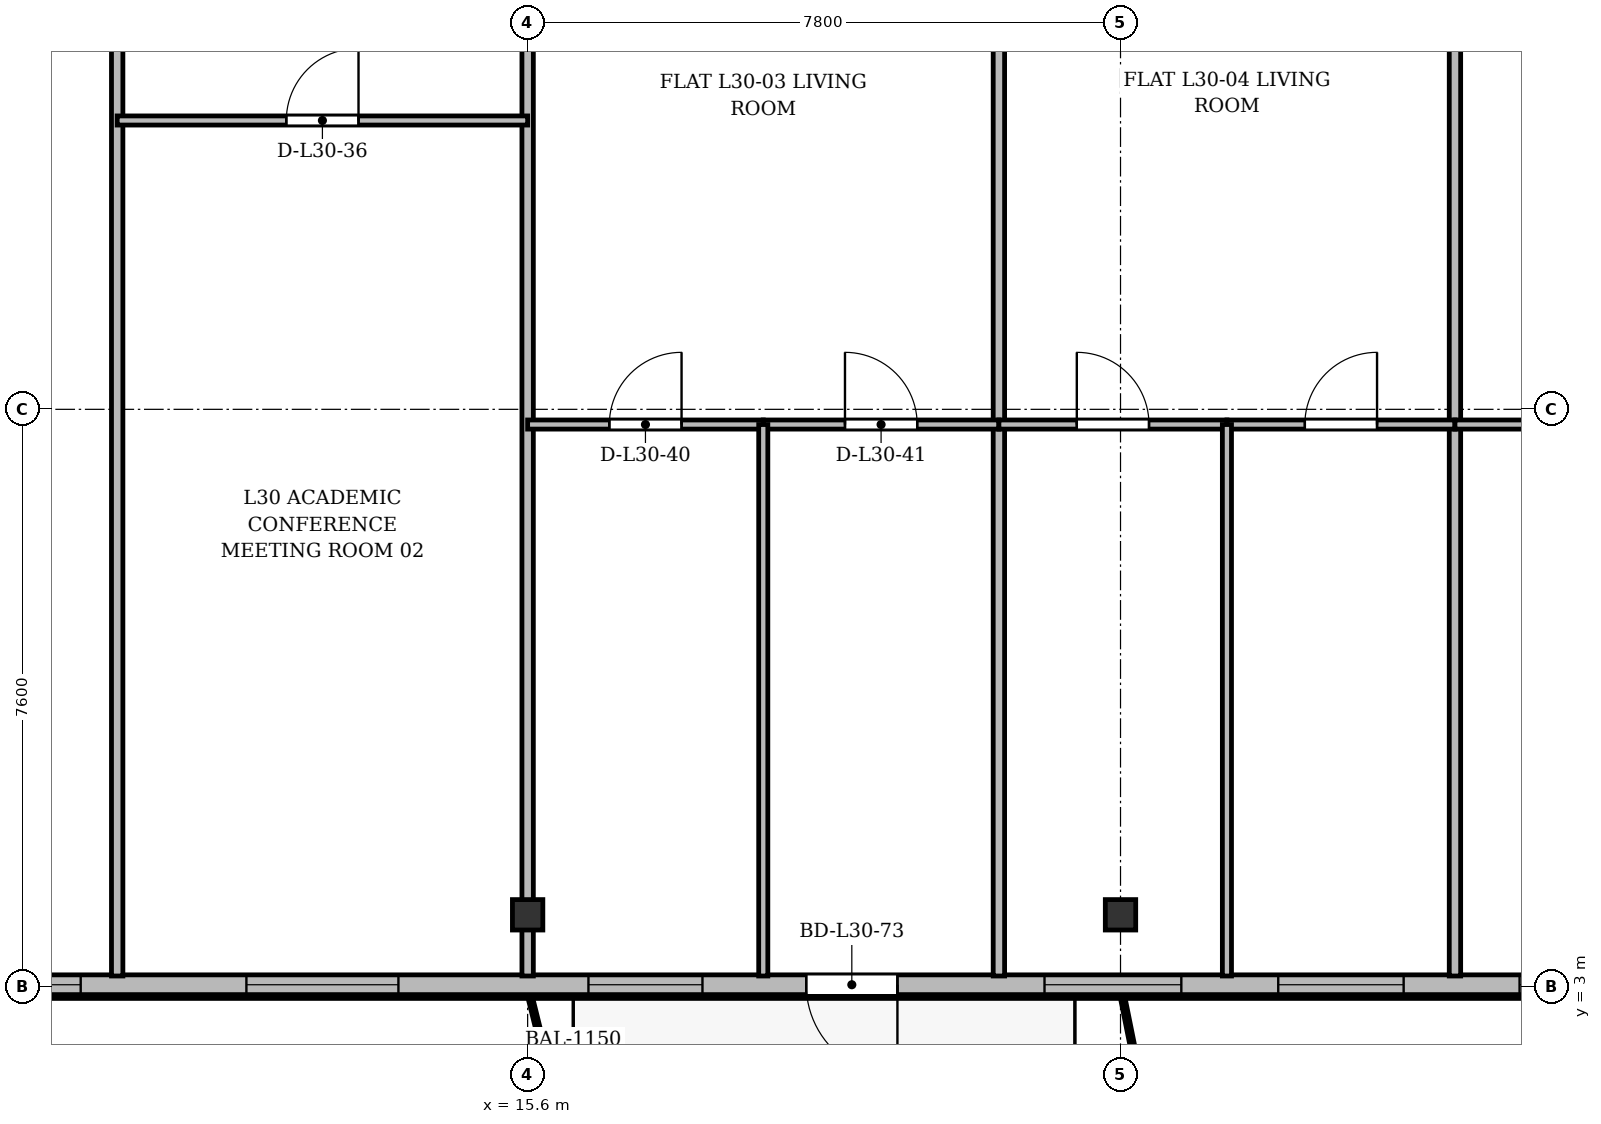
"""IFC4 building model, lengths in metres.
Left out: names, types, materials, properties, quantities, classifications, styles, units other than length and angle.
Written with IfcOpenShell. Run it as: python <this file> out.ifc"""

import sys

from ifc_helpers import new_model, si_unit, direction, frame, frame_2d, origin, origin_2d, place, context, subcontext, project, spatial, rectangle, i_section, extrude, source, transform, mapped, element, fill, save


model = new_model("IFC4")
c1 = context("Model", 3, precision=1e-05, world=origin(), true_north=direction((0.0, 1.0)))
c2 = subcontext(c1, "Body", "Model", "MODEL_VIEW")
j1 = project(units=[si_unit("LENGTHUNIT", "METRE"), si_unit("PLANEANGLEUNIT", "RADIAN")], contexts=[c1])
p1 = place(None, origin())
s1 = spatial("IfcSite", under=j1, at=p1, CompositionType="ELEMENT")
p2 = place(p1, origin())
s2 = spatial("IfcBuilding", under=s1, at=p2, CompositionType="ELEMENT")
p3 = place(p2, frame((0.0, 0.0, 117.7)))
s3 = spatial("IfcBuildingStorey", under=s2, at=p3, CompositionType="ELEMENT", Elevation=117.7)
m1 = source(origin(), c2, "Body", "SweptSolid", [
    extrude(i_section(OverallWidth=0.4, OverallDepth=0.4, WebThickness=0.022, FlangeThickness=0.035, at=origin_2d()), origin(), (0.0, 0.0, 1.0), 3.6),
])
for number, where, z_axis, x_axis in (
    (1, (15.6, 3.95, 0.0), (0.0, 0.0, 1.0), (1.0, 0.0, 0.0)),
    (2, (23.4, 3.95, 0.0), (0.0, 0.0, 1.0), (1.0, 0.0, 0.0)),
):
    element("IfcColumn", number, at=place(p3, frame(where, z_axis=z_axis, x_axis=x_axis)), inside=s3, PredefinedType="COLUMN", context=c2, shape_type="MappedRepresentation", body=[
        mapped(m1, transform((0.0, 0.0, 0.0), x_axis=(1.0, 0.0, 0.0), y_axis=(0.0, 1.0, 0.0), z_axis=(0.0, 0.0, 1.0), scale=1.0)),
    ])
p4 = place(p3, frame((66.9, 3.03, 0.0), z_axis=(0.0, 0.0, 1.0), x_axis=(-1.0, 0.0, 0.0)))
e3 = element("IfcWall", 3, at=p4, inside=s3, PredefinedType="SOLIDWALL", context=c2, shape_type="SweptSolid", body=[
    extrude(rectangle(XDim=59.4, YDim=0.26, at=frame_2d((29.7, 0.0))), origin(), (0.0, 0.0, 1.0), 3.34),
])
p5 = place(p4, frame((0.395, 0.0, 0.9)))
e4 = element("IfcOpeningElement", 4, at=p5, cuts=e3, PredefinedType="OPENING", context=c2, shape_type="SweptSolid", body=[
    extrude(rectangle(XDim=1.8, YDim=1.8, at=frame_2d((0.9, 0.9))), frame((0.0, 0.14, 0.0), z_axis=(0.0, -1.0, 0.0), x_axis=(1.0, 0.0, 0.0)), (0.0, 0.0, 1.0), 0.28),
])
p6 = place(p4, frame((4.2, 0.0, 0.9)))
e5 = element("IfcOpeningElement", 5, at=p6, cuts=e3, PredefinedType="OPENING", context=c2, shape_type="SweptSolid", body=[
    extrude(rectangle(XDim=2.2, YDim=1.8, at=frame_2d((1.1, 0.9))), frame((0.0, 0.14, 0.0), z_axis=(0.0, -1.0, 0.0), x_axis=(1.0, 0.0, 0.0)), (0.0, 0.0, 1.0), 0.28),
])
p7 = place(p4, frame((11.25, 0.0, 0.9)))
e6 = element("IfcOpeningElement", 6, at=p7, cuts=e3, PredefinedType="OPENING", context=c2, shape_type="SweptSolid", body=[
    extrude(rectangle(XDim=1.5, YDim=1.75, at=frame_2d((0.75, 0.875))), frame((0.0, 0.14, 0.0), z_axis=(0.0, -1.0, 0.0), x_axis=(1.0, 0.0, 0.0)), (0.0, 0.0, 1.0), 0.28),
])
p8 = place(p4, frame((16.92, 0.0, 0.0)))
e7 = element("IfcOpeningElement", 7, at=p8, cuts=e3, PredefinedType="OPENING", context=c2, shape_type="SweptSolid", body=[
    extrude(rectangle(XDim=1.2, YDim=2.2, at=frame_2d((0.6, 1.1))), frame((0.0, 0.14, 0.0), z_axis=(0.0, -1.0, 0.0), x_axis=(1.0, 0.0, 0.0)), (0.0, 0.0, 1.0), 0.28),
])
p9 = place(p4, frame((18.675, 0.0, 0.9)))
e8 = element("IfcOpeningElement", 8, at=p9, cuts=e3, PredefinedType="OPENING", context=c2, shape_type="SweptSolid", body=[
    extrude(rectangle(XDim=1.65, YDim=1.85, at=frame_2d((0.825, 0.925))), frame((0.0, 0.14, 0.0), z_axis=(0.0, -1.0, 0.0), x_axis=(1.0, 0.0, 0.0)), (0.0, 0.0, 1.0), 0.28),
])
p10 = place(p4, frame((21.0, 0.0, 0.9)))
e9 = element("IfcOpeningElement", 9, at=p10, cuts=e3, PredefinedType="OPENING", context=c2, shape_type="SweptSolid", body=[
    extrude(rectangle(XDim=1.8, YDim=1.8, at=frame_2d((0.9, 0.9))), frame((0.0, 0.14, 0.0), z_axis=(0.0, -1.0, 0.0), x_axis=(1.0, 0.0, 0.0)), (0.0, 0.0, 1.0), 0.28),
])
p11 = place(p4, frame((26.3, 0.0, 0.9)))
e10 = element("IfcOpeningElement", 10, at=p11, cuts=e3, PredefinedType="OPENING", context=c2, shape_type="SweptSolid", body=[
    extrude(rectangle(XDim=2.2, YDim=1.8, at=frame_2d((1.1, 0.9))), frame((0.0, 0.14, 0.0), z_axis=(0.0, -1.0, 0.0), x_axis=(1.0, 0.0, 0.0)), (0.0, 0.0, 1.0), 0.28),
])
p12 = place(p4, frame((32.8, 0.0, 0.9)))
e11 = element("IfcOpeningElement", 11, at=p12, cuts=e3, PredefinedType="OPENING", context=c2, shape_type="SweptSolid", body=[
    extrude(rectangle(XDim=1.5, YDim=1.75, at=frame_2d((0.75, 0.875))), frame((0.0, 0.14, 0.0), z_axis=(0.0, -1.0, 0.0), x_axis=(1.0, 0.0, 0.0)), (0.0, 0.0, 1.0), 0.28),
])
p13 = place(p4, frame((36.25, 0.0, 0.9)))
e12 = element("IfcOpeningElement", 12, at=p13, cuts=e3, PredefinedType="OPENING", context=c2, shape_type="SweptSolid", body=[
    extrude(rectangle(XDim=2.0, YDim=1.95, at=frame_2d((1.0, 0.975))), frame((0.0, 0.14, 0.0), z_axis=(0.0, -1.0, 0.0), x_axis=(1.0, 0.0, 0.0)), (0.0, 0.0, 1.0), 0.28),
])
p14 = place(p4, frame((39.775, 0.0, 0.9)))
e13 = element("IfcOpeningElement", 13, at=p14, cuts=e3, PredefinedType="OPENING", context=c2, shape_type="SweptSolid", body=[
    extrude(rectangle(XDim=1.65, YDim=1.85, at=frame_2d((0.825, 0.925))), frame((0.0, 0.14, 0.0), z_axis=(0.0, -1.0, 0.0), x_axis=(1.0, 0.0, 0.0)), (0.0, 0.0, 1.0), 0.28),
])
p15 = place(p4, frame((42.7, 0.0, 0.9)))
e14 = element("IfcOpeningElement", 14, at=p15, cuts=e3, PredefinedType="OPENING", context=c2, shape_type="SweptSolid", body=[
    extrude(rectangle(XDim=1.8, YDim=1.8, at=frame_2d((0.9, 0.9))), frame((0.0, 0.14, 0.0), z_axis=(0.0, -1.0, 0.0), x_axis=(1.0, 0.0, 0.0)), (0.0, 0.0, 1.0), 0.28),
])
p16 = place(p4, frame((46.435, 0.0, 0.0)))
e15 = element("IfcOpeningElement", 15, at=p16, cuts=e3, PredefinedType="OPENING", context=c2, shape_type="SweptSolid", body=[
    extrude(rectangle(XDim=1.2, YDim=2.2, at=frame_2d((0.6, 1.1))), frame((0.0, 0.14, 0.0), z_axis=(0.0, -1.0, 0.0), x_axis=(1.0, 0.0, 0.0)), (0.0, 0.0, 1.0), 0.28),
])
p17 = place(p4, frame((49.0, 0.0, 0.9)))
e16 = element("IfcOpeningElement", 16, at=p17, cuts=e3, PredefinedType="OPENING", context=c2, shape_type="SweptSolid", body=[
    extrude(rectangle(XDim=1.5, YDim=1.75, at=frame_2d((0.75, 0.875))), frame((0.0, 0.14, 0.0), z_axis=(0.0, -1.0, 0.0), x_axis=(1.0, 0.0, 0.0)), (0.0, 0.0, 1.0), 0.28),
])
p18 = place(p4, frame((53.0, 0.0, 0.9)))
e17 = element("IfcOpeningElement", 17, at=p18, cuts=e3, PredefinedType="OPENING", context=c2, shape_type="SweptSolid", body=[
    extrude(rectangle(XDim=2.0, YDim=1.95, at=frame_2d((1.0, 0.975))), frame((0.0, 0.14, 0.0), z_axis=(0.0, -1.0, 0.0), x_axis=(1.0, 0.0, 0.0)), (0.0, 0.0, 1.0), 0.28),
])
p19 = place(p4, frame((57.18, 0.0, 0.9)))
e18 = element("IfcOpeningElement", 18, at=p19, cuts=e3, PredefinedType="OPENING", context=c2, shape_type="SweptSolid", body=[
    extrude(rectangle(XDim=1.65, YDim=1.85, at=frame_2d((0.825, 0.925))), frame((0.0, 0.14, 0.0), z_axis=(0.0, -1.0, 0.0), x_axis=(1.0, 0.0, 0.0)), (0.0, 0.0, 1.0), 0.28),
])
p20 = place(p3, frame((10.2, 3.145, 0.0), z_axis=(0.0, 0.0, 1.0), x_axis=(0.0, 1.0, 0.0)))
e19 = element("IfcWall", 19, at=p20, inside=s3, PredefinedType="PARTITIONING", context=c2, shape_type="SweptSolid", body=[
    extrude(rectangle(XDim=24.455, YDim=0.15, at=frame_2d((12.228, 0.0))), origin(), (0.0, 0.0, 1.0), 2.752),
])
p21 = place(p3, frame((15.6, 3.145, 0.0), z_axis=(0.0, 0.0, 1.0), x_axis=(0.0, 1.0, 0.0)))
e20 = element("IfcWall", 20, at=p21, inside=s3, PredefinedType="PARTITIONING", context=c2, shape_type="SweptSolid", body=[
    extrude(rectangle(XDim=24.455, YDim=0.15, at=frame_2d((12.228, 0.0))), origin(), (0.0, 0.0, 1.0), 2.84),
])
for number, where, z_axis, x_axis in (
    (21, (21.8, 3.145, 0.0), (0.0, 0.0, 1.0), (0.0, 1.0, 0.0)),
    (22, (27.8, 3.145, 0.0), (0.0, 0.0, 1.0), (0.0, 1.0, 0.0)),
):
    element("IfcWall", number, at=place(p3, frame(where, z_axis=z_axis, x_axis=x_axis)), inside=s3, PredefinedType="PARTITIONING", context=c2, shape_type="SweptSolid", body=[
        extrude(rectangle(XDim=24.455, YDim=0.15, at=frame_2d((12.228, 0.0))), origin(), (0.0, 0.0, 1.0), 2.752),
    ])
p22 = place(p3, frame((10.2, 14.4, 0.0), z_axis=(0.0, 0.0, 1.0), x_axis=(1.0, 0.0, 0.0)))
e23 = element("IfcWall", 23, at=p22, inside=s3, PredefinedType="PARTITIONING", context=c2, shape_type="SweptSolid", body=[
    extrude(rectangle(XDim=5.4, YDim=0.12, at=frame_2d((2.7, 0.0))), origin(), (0.0, 0.0, 1.0), 2.84),
])
p23 = place(p22, frame((2.225, 0.0, 0.0)))
e24 = element("IfcOpeningElement", 24, at=p23, cuts=e23, PredefinedType="OPENING", context=c2, shape_type="SweptSolid", body=[
    extrude(rectangle(XDim=0.95, YDim=2.15, at=frame_2d((0.475, 1.075))), frame((0.0, 0.07, 0.0), z_axis=(0.0, -1.0, 0.0), x_axis=(1.0, 0.0, 0.0)), (0.0, 0.0, 1.0), 0.14),
])
p24 = place(p3, frame((15.6, 10.4, 0.0), z_axis=(0.0, 0.0, 1.0), x_axis=(1.0, 0.0, 0.0)))
e25 = element("IfcWall", 25, at=p24, inside=s3, PredefinedType="PARTITIONING", context=c2, shape_type="SweptSolid", body=[
    extrude(rectangle(XDim=3.1, YDim=0.12, at=frame_2d((1.55, 0.0))), origin(), (0.0, 0.0, 1.0), 2.84),
])
p25 = place(p24, frame((1.075, 0.0, 0.0)))
e26 = element("IfcOpeningElement", 26, at=p25, cuts=e25, PredefinedType="OPENING", context=c2, shape_type="SweptSolid", body=[
    extrude(rectangle(XDim=0.95, YDim=2.15, at=frame_2d((0.475, 1.075))), frame((0.0, 0.07, 0.0), z_axis=(0.0, -1.0, 0.0), x_axis=(1.0, 0.0, 0.0)), (0.0, 0.0, 1.0), 0.14),
])
p26 = place(p3, frame((18.7, 10.4, 0.0), z_axis=(0.0, 0.0, 1.0), x_axis=(1.0, 0.0, 0.0)))
e27 = element("IfcWall", 27, at=p26, inside=s3, PredefinedType="PARTITIONING", context=c2, shape_type="SweptSolid", body=[
    extrude(rectangle(XDim=3.1, YDim=0.12, at=frame_2d((1.55, 0.0))), origin(), (0.0, 0.0, 1.0), 3.34),
])
p27 = place(p26, frame((1.075, 0.0, 0.0)))
e28 = element("IfcOpeningElement", 28, at=p27, cuts=e27, PredefinedType="OPENING", context=c2, shape_type="SweptSolid", body=[
    extrude(rectangle(XDim=0.95, YDim=2.15, at=frame_2d((0.475, 1.075))), frame((0.0, 0.07, 0.0), z_axis=(0.0, -1.0, 0.0), x_axis=(1.0, 0.0, 0.0)), (0.0, 0.0, 1.0), 0.14),
])
p28 = place(p3, frame((18.7, 3.145, 0.0), z_axis=(0.0, 0.0, 1.0), x_axis=(0.0, 1.0, 0.0)))
e29 = element("IfcWall", 29, at=p28, inside=s3, PredefinedType="PARTITIONING", context=c2, shape_type="SweptSolid", body=[
    extrude(rectangle(XDim=7.255, YDim=0.12, at=frame_2d((3.627, 0.0))), origin(), (0.0, 0.0, 1.0), 2.752),
])
p29 = place(p3, frame((21.8, 10.4, 0.0), z_axis=(0.0, 0.0, 1.0), x_axis=(1.0, 0.0, 0.0)))
e30 = element("IfcWall", 30, at=p29, inside=s3, PredefinedType="PARTITIONING", context=c2, shape_type="SweptSolid", body=[
    extrude(rectangle(XDim=3.0, YDim=0.12, at=frame_2d((1.5, 0.0))), origin(), (0.0, 0.0, 1.0), 2.84),
])
p30 = place(p29, frame((1.025, 0.0, 0.0)))
e31 = element("IfcOpeningElement", 31, at=p30, cuts=e30, PredefinedType="OPENING", context=c2, shape_type="SweptSolid", body=[
    extrude(rectangle(XDim=0.95, YDim=2.15, at=frame_2d((0.475, 1.075))), frame((0.0, 0.07, 0.0), z_axis=(0.0, -1.0, 0.0), x_axis=(1.0, 0.0, 0.0)), (0.0, 0.0, 1.0), 0.14),
])
p31 = place(p3, frame((24.8, 10.4, 0.0), z_axis=(0.0, 0.0, 1.0), x_axis=(1.0, 0.0, 0.0)))
e32 = element("IfcWall", 32, at=p31, inside=s3, PredefinedType="PARTITIONING", context=c2, shape_type="SweptSolid", body=[
    extrude(rectangle(XDim=3.0, YDim=0.12, at=frame_2d((1.5, 0.0))), origin(), (0.0, 0.0, 1.0), 3.34),
])
p32 = place(p31, frame((1.025, 0.0, 0.0)))
e33 = element("IfcOpeningElement", 33, at=p32, cuts=e32, PredefinedType="OPENING", context=c2, shape_type="SweptSolid", body=[
    extrude(rectangle(XDim=0.95, YDim=2.15, at=frame_2d((0.475, 1.075))), frame((0.0, 0.07, 0.0), z_axis=(0.0, -1.0, 0.0), x_axis=(1.0, 0.0, 0.0)), (0.0, 0.0, 1.0), 0.14),
])
p33 = place(p3, frame((24.8, 3.145, 0.0), z_axis=(0.0, 0.0, 1.0), x_axis=(0.0, 1.0, 0.0)))
e34 = element("IfcWall", 34, at=p33, inside=s3, PredefinedType="PARTITIONING", context=c2, shape_type="SweptSolid", body=[
    extrude(rectangle(XDim=7.255, YDim=0.12, at=frame_2d((3.627, 0.0))), origin(), (0.0, 0.0, 1.0), 2.752),
])
p34 = place(p3, frame((27.8, 10.4, 0.0), z_axis=(0.0, 0.0, 1.0), x_axis=(1.0, 0.0, 0.0)))
e35 = element("IfcWall", 35, at=p34, inside=s3, PredefinedType="PARTITIONING", context=c2, shape_type="SweptSolid", body=[
    extrude(rectangle(XDim=3.7, YDim=0.12, at=frame_2d((1.85, 0.0))), origin(), (0.0, 0.0, 1.0), 2.84),
])
p35 = place(p34, frame((1.285, 0.0, 0.0)))
e36 = element("IfcOpeningElement", 36, at=p35, cuts=e35, PredefinedType="OPENING", context=c2, shape_type="SweptSolid", body=[
    extrude(rectangle(XDim=0.95, YDim=2.15, at=frame_2d((0.475, 1.075))), frame((0.0, 0.07, 0.0), z_axis=(0.0, -1.0, 0.0), x_axis=(1.0, 0.0, 0.0)), (0.0, 0.0, 1.0), 0.14),
])
m2 = source(origin(), c2, "Body", "SweptSolid", [
    extrude(rectangle(XDim=2.0, YDim=1.95, at=frame_2d((1.0, 0.975))), frame((0.0, 0.03, 0.0), z_axis=(0.0, -1.0, 0.0), x_axis=(1.0, 0.0, 0.0)), (0.0, 0.0, 1.0), 0.06),
])
p36 = place(p13, origin())
e37 = element("IfcWindow", 37, at=p36, inside=s3, PartitioningType="SINGLE_PANEL", PredefinedType="WINDOW", context=c2, shape_type="MappedRepresentation", body=[
    mapped(m2, transform((0.0, 0.0, 0.0), x_axis=(1.0, 0.0, 0.0), y_axis=(0.0, 1.0, 0.0), z_axis=(0.0, 0.0, 1.0), scale=1.0)),
])
fill(e12, e37)
m3 = source(origin(), c2, "Body", "SweptSolid", [
    extrude(rectangle(XDim=1.65, YDim=1.85, at=frame_2d((0.825, 0.925))), frame((0.0, 0.03, 0.0), z_axis=(0.0, -1.0, 0.0), x_axis=(1.0, 0.0, 0.0)), (0.0, 0.0, 1.0), 0.06),
])
p37 = place(p14, origin())
e38 = element("IfcWindow", 38, at=p37, inside=s3, PartitioningType="SINGLE_PANEL", PredefinedType="WINDOW", context=c2, shape_type="MappedRepresentation", body=[
    mapped(m3, transform((0.0, 0.0, 0.0), x_axis=(1.0, 0.0, 0.0), y_axis=(0.0, 1.0, 0.0), z_axis=(0.0, 0.0, 1.0), scale=1.0)),
])
fill(e13, e38)
m4 = source(origin(), c2, "Body", "SweptSolid", [
    extrude(rectangle(XDim=1.8, YDim=1.8, at=frame_2d((0.9, 0.9))), frame((0.0, 0.03, 0.0), z_axis=(0.0, -1.0, 0.0), x_axis=(1.0, 0.0, 0.0)), (0.0, 0.0, 1.0), 0.06),
])
p38 = place(p15, origin())
e39 = element("IfcWindow", 39, at=p38, inside=s3, PartitioningType="SINGLE_PANEL", PredefinedType="WINDOW", context=c2, shape_type="MappedRepresentation", body=[
    mapped(m4, transform((0.0, 0.0, 0.0), x_axis=(1.0, 0.0, 0.0), y_axis=(0.0, 1.0, 0.0), z_axis=(0.0, 0.0, 1.0), scale=1.0)),
])
fill(e14, e39)
m5 = source(origin(), c2, "Body", "SweptSolid", [
    extrude(rectangle(XDim=1.2, YDim=2.2, at=frame_2d((0.6, 1.1))), frame((0.0, 0.025, 0.0), z_axis=(0.0, -1.0, 0.0), x_axis=(1.0, 0.0, 0.0)), (0.0, 0.0, 1.0), 0.05),
])
p39 = place(p16, origin())
e40 = element("IfcDoor", 40, at=p39, inside=s3, OperationType="SINGLE_SWING_LEFT", PredefinedType="DOOR", context=c2, shape_type="MappedRepresentation", body=[
    mapped(m5, transform((0.0, 0.0, 0.0), x_axis=(1.0, 0.0, 0.0), y_axis=(0.0, 1.0, 0.0), z_axis=(0.0, 0.0, 1.0), scale=1.0)),
])
fill(e15, e40)
m6 = source(origin(), c2, "Body", "SweptSolid", [
    extrude(rectangle(XDim=1.5, YDim=1.75, at=frame_2d((0.75, 0.875))), frame((0.0, 0.03, 0.0), z_axis=(0.0, -1.0, 0.0), x_axis=(1.0, 0.0, 0.0)), (0.0, 0.0, 1.0), 0.06),
])
p40 = place(p17, origin())
e41 = element("IfcWindow", 41, at=p40, inside=s3, PartitioningType="SINGLE_PANEL", PredefinedType="WINDOW", context=c2, shape_type="MappedRepresentation", body=[
    mapped(m6, transform((0.0, 0.0, 0.0), x_axis=(1.0, 0.0, 0.0), y_axis=(0.0, 1.0, 0.0), z_axis=(0.0, 0.0, 1.0), scale=1.0)),
])
fill(e16, e41)
p41 = place(p18, origin())
e42 = element("IfcWindow", 42, at=p41, inside=s3, PartitioningType="SINGLE_PANEL", PredefinedType="WINDOW", context=c2, shape_type="MappedRepresentation", body=[
    mapped(m2, transform((0.0, 0.0, 0.0), x_axis=(1.0, 0.0, 0.0), y_axis=(0.0, 1.0, 0.0), z_axis=(0.0, 0.0, 1.0), scale=1.0)),
])
fill(e17, e42)
p42 = place(p19, origin())
e43 = element("IfcWindow", 43, at=p42, inside=s3, PartitioningType="SINGLE_PANEL", PredefinedType="WINDOW", context=c2, shape_type="MappedRepresentation", body=[
    mapped(m3, transform((0.0, 0.0, 0.0), x_axis=(1.0, 0.0, 0.0), y_axis=(0.0, 1.0, 0.0), z_axis=(0.0, 0.0, 1.0), scale=1.0)),
])
fill(e18, e43)
m7 = source(origin(), c2, "Body", "SweptSolid", [
    extrude(rectangle(XDim=0.95, YDim=2.15, at=frame_2d((0.475, 1.075))), frame((0.0, 0.025, 0.0), z_axis=(0.0, -1.0, 0.0), x_axis=(1.0, 0.0, 0.0)), (0.0, 0.0, 1.0), 0.05),
])
p43 = place(p23, origin())
e44 = element("IfcDoor", 44, at=p43, inside=s3, OperationType="SINGLE_SWING_RIGHT", PredefinedType="DOOR", context=c2, shape_type="MappedRepresentation", body=[
    mapped(m7, transform((0.0, 0.0, 0.0), x_axis=(1.0, 0.0, 0.0), y_axis=(0.0, 1.0, 0.0), z_axis=(0.0, 0.0, 1.0), scale=1.0)),
])
fill(e24, e44)
p44 = place(p25, origin())
e45 = element("IfcDoor", 45, at=p44, inside=s3, OperationType="SINGLE_SWING_RIGHT", PredefinedType="DOOR", context=c2, shape_type="MappedRepresentation", body=[
    mapped(m7, transform((0.0, 0.0, 0.0), x_axis=(1.0, 0.0, 0.0), y_axis=(0.0, 1.0, 0.0), z_axis=(0.0, 0.0, 1.0), scale=1.0)),
])
fill(e26, e45)
p45 = place(p27, origin())
e46 = element("IfcDoor", 46, at=p45, inside=s3, OperationType="SINGLE_SWING_LEFT", PredefinedType="DOOR", context=c2, shape_type="MappedRepresentation", body=[
    mapped(m7, transform((0.0, 0.0, 0.0), x_axis=(1.0, 0.0, 0.0), y_axis=(0.0, 1.0, 0.0), z_axis=(0.0, 0.0, 1.0), scale=1.0)),
])
fill(e28, e46)
p46 = place(p30, origin())
e47 = element("IfcDoor", 47, at=p46, inside=s3, OperationType="SINGLE_SWING_LEFT", PredefinedType="DOOR", context=c2, shape_type="MappedRepresentation", body=[
    mapped(m7, transform((0.0, 0.0, 0.0), x_axis=(1.0, 0.0, 0.0), y_axis=(0.0, 1.0, 0.0), z_axis=(0.0, 0.0, 1.0), scale=1.0)),
])
fill(e31, e47)
p47 = place(p32, origin())
e48 = element("IfcDoor", 48, at=p47, inside=s3, OperationType="SINGLE_SWING_RIGHT", PredefinedType="DOOR", context=c2, shape_type="MappedRepresentation", body=[
    mapped(m7, transform((0.0, 0.0, 0.0), x_axis=(1.0, 0.0, 0.0), y_axis=(0.0, 1.0, 0.0), z_axis=(0.0, 0.0, 1.0), scale=1.0)),
])
fill(e33, e48)
save(model, sys.argv[1])
